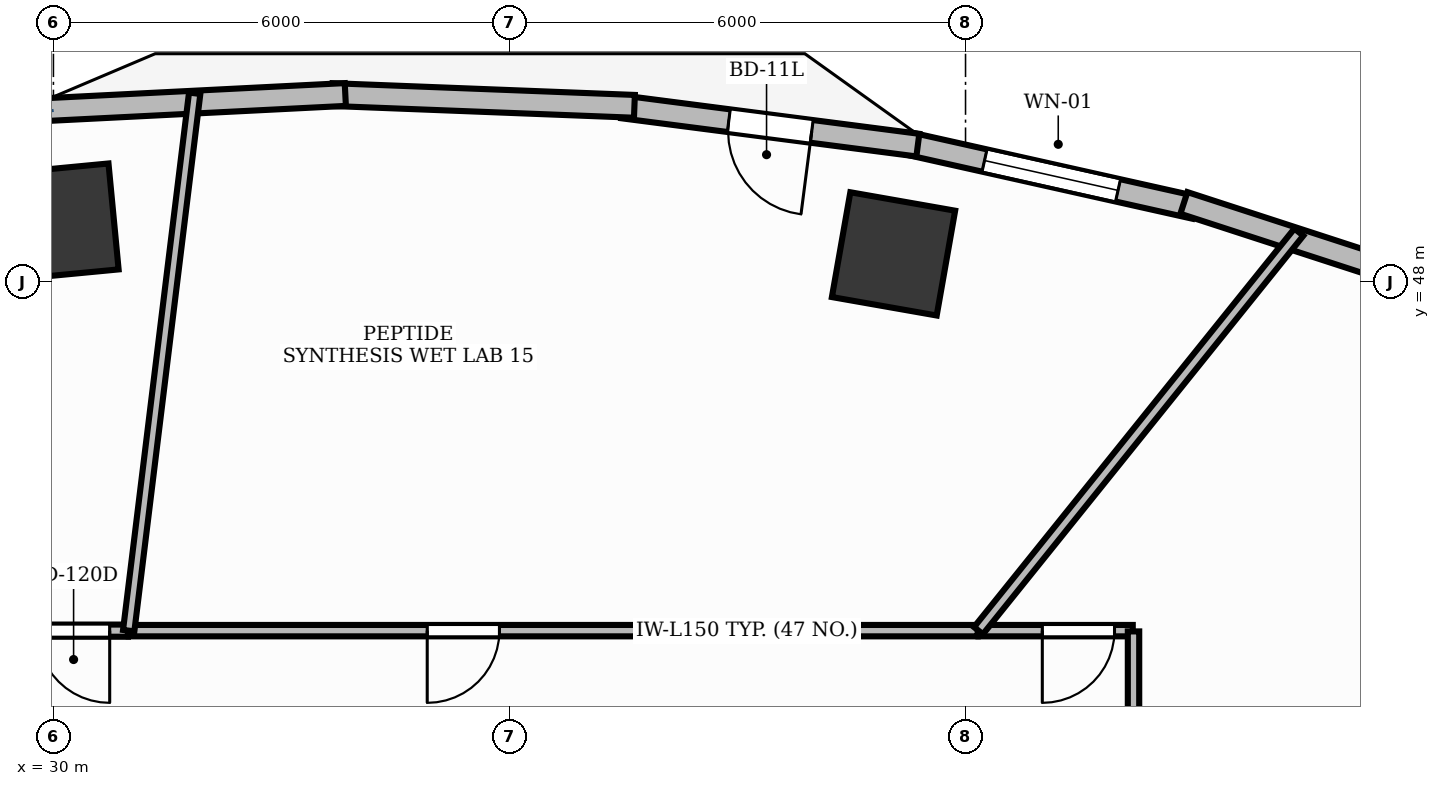
"""IFC4 building model, lengths in metres.
Left out: names, types, materials, properties, quantities, classifications, styles, units other than length and angle.
Written with IfcOpenShell. Run it as: python <this file> out.ifc"""

import sys

from ifc_helpers import new_model, si_unit, direction, frame, frame_2d, origin, origin_2d, place, context, subcontext, project, spatial, rectangle, extrude, element, fill, save


model = new_model("IFC4")
c1 = context("Model", 3, precision=1e-05, world=origin(), true_north=direction((0.0, 1.0)))
c2 = subcontext(c1, "Body", "Model", "MODEL_VIEW")
j1 = project(units=[si_unit("LENGTHUNIT", "METRE"), si_unit("PLANEANGLEUNIT", "RADIAN")], contexts=[c1])
p1 = place(None, origin())
s1 = spatial("IfcSite", under=j1, at=p1, CompositionType="ELEMENT")
p2 = place(p1, origin())
s2 = spatial("IfcBuilding", under=s1, at=p2, CompositionType="ELEMENT")
p3 = place(p2, frame((0.0, 0.0, 59.4)))
s3 = spatial("IfcBuildingStorey", under=s2, at=p3, CompositionType="ELEMENT", Elevation=59.4)
for number, where, z_axis, x_axis in (
    (1, (41.052, 48.367, -0.0), (0.0, 0.0, 1.0), (-0.985, 0.173, 0.0)),
    (2, (30.094, 48.792, -0.0), (0.0, 0.0, 1.0), (0.995, 0.095, 0.0)),
):
    element("IfcColumn", number, at=place(p3, frame(where, z_axis=z_axis, x_axis=x_axis)), inside=s3, PredefinedType="COLUMN", context=c2, shape_type="SweptSolid", body=[
        extrude(rectangle(XDim=1.4, YDim=1.4, at=origin_2d()), origin(), (0.0, 0.0, 1.0), 3.901),
    ])
p4 = place(p3, frame((45.016, 48.976, 0.0), z_axis=(0.0, 0.0, 1.0), x_axis=(-0.9758772609, 0.218319883791, 0.0)))
e3 = element("IfcWall", 3, at=p4, inside=s3, PredefinedType="STANDARD", context=c2, shape_type="SweptSolid", body=[
    extrude(rectangle(XDim=3.869, YDim=0.3, at=frame_2d((1.935, 0.0))), origin(), (0.0, 0.0, 1.0), 3.9),
])
p5 = place(p4, frame((1.034, 0.0, 0.9)))
e4 = element("IfcOpeningElement", 4, at=p5, cuts=e3, PredefinedType="OPENING", context=c2, shape_type="SweptSolid", body=[
    extrude(rectangle(XDim=1.8, YDim=2.1, at=frame_2d((0.9, 1.05))), frame((0.0, 0.165, 0.0), z_axis=(0.0, -1.0, 0.0), x_axis=(1.0, 0.0, 0.0)), (0.0, 0.0, 1.0), 0.33),
])
p6 = place(p3, frame((41.373, 49.798, 0.0), z_axis=(0.0, 0.0, 1.0), x_axis=(-0.991741322416, 0.128254237408, 0.0)))
e5 = element("IfcWall", 5, at=p6, inside=s3, PredefinedType="STANDARD", context=c2, shape_type="SweptSolid", body=[
    extrude(rectangle(XDim=3.916, YDim=0.3, at=frame_2d((1.958, 0.0))), origin(), (0.0, 0.0, 1.0), 3.47),
])
p7 = place(p6, frame((1.408, 0.0, 0.0)))
e6 = element("IfcOpeningElement", 6, at=p7, cuts=e5, PredefinedType="OPENING", context=c2, shape_type="SweptSolid", body=[
    extrude(rectangle(XDim=1.1, YDim=2.15, at=frame_2d((0.55, 1.075))), frame((0.0, 0.165, 0.0), z_axis=(0.0, -1.0, 0.0), x_axis=(1.0, 0.0, 0.0)), (0.0, 0.0, 1.0), 0.33),
])
p8 = place(p3, frame((48.525, 47.849, 0.0), z_axis=(0.0, 0.0, 1.0), x_axis=(-0.950965833732, 0.309295947393, 0.0)))
e7 = element("IfcWall", 7, at=p8, inside=s3, PredefinedType="STANDARD", context=c2, shape_type="SweptSolid", body=[
    extrude(rectangle(XDim=3.84, YDim=0.3, at=frame_2d((1.92, 0.0))), origin(), (0.0, 0.0, 1.0), 3.9),
])
p9 = place(p3, frame((37.644, 50.308, 0.0), z_axis=(0.0, 0.0, 1.0), x_axis=(-0.999245411623, 0.038840794937, 0.0)))
e8 = element("IfcWall", 8, at=p9, inside=s3, PredefinedType="STANDARD", context=c2, shape_type="SweptSolid", body=[
    extrude(rectangle(XDim=3.979, YDim=0.3, at=frame_2d((1.989, 0.0))), origin(), (0.0, 0.0, 1.0), 3.9),
])
p10 = place(p3, frame((33.84, 50.463, 0.0), z_axis=(0.0, 0.0, 1.0), x_axis=(-0.998732359232, -0.050335619826, 0.0)))
e9 = element("IfcWall", 9, at=p10, inside=s3, PredefinedType="STANDARD", context=c2, shape_type="SweptSolid", body=[
    extrude(rectangle(XDim=3.977, YDim=0.3, at=frame_2d((1.989, 0.0))), origin(), (0.0, 0.0, 1.0), 3.47),
])
p11 = place(p3, frame((44.2, 43.41, 0.0), z_axis=(0.0, 0.0, 1.0), x_axis=(-1.0, 0.0, 0.0)))
e10 = element("IfcWall", 10, at=p11, inside=s3, PredefinedType="PARTITIONING", context=c2, shape_type="SweptSolid", body=[
    extrude(rectangle(XDim=2.03, YDim=0.15, at=frame_2d((1.015, 0.0))), origin(), (0.0, 0.0, 1.0), 2.91),
])
p12 = place(p11, frame((0.24, 0.0, 0.0)))
e11 = element("IfcOpeningElement", 11, at=p12, cuts=e10, PredefinedType="OPENING", context=c2, shape_type="SweptSolid", body=[
    extrude(rectangle(XDim=0.95, YDim=2.15, at=frame_2d((0.475, 1.075))), frame((0.0, 0.09, 0.0), z_axis=(0.0, -1.0, 0.0), x_axis=(1.0, 0.0, 0.0)), (0.0, 0.0, 1.0), 0.18),
])
p13 = place(p3, frame((42.16, 43.41, 0.0), z_axis=(0.0, 0.0, 1.0), x_axis=(-1.0, 0.0, 0.0)))
e12 = element("IfcWall", 12, at=p13, inside=s3, PredefinedType="PARTITIONING", context=c2, shape_type="SweptSolid", body=[
    extrude(rectangle(XDim=11.17, YDim=0.15, at=frame_2d((5.585, 0.0))), origin(), (0.0, 0.0, 1.0), 2.91),
])
p14 = place(p13, frame((6.292, 0.0, 0.0)))
e13 = element("IfcOpeningElement", 13, at=p14, cuts=e12, PredefinedType="OPENING", context=c2, shape_type="SweptSolid", body=[
    extrude(rectangle(XDim=0.95, YDim=2.15, at=frame_2d((0.475, 1.075))), frame((0.0, 0.09, 0.0), z_axis=(0.0, -1.0, 0.0), x_axis=(1.0, 0.0, 0.0)), (0.0, 0.0, 1.0), 0.18),
])
p15 = place(p3, frame((30.98, 43.41, 0.0), z_axis=(0.0, 0.0, 1.0), x_axis=(-1.0, 0.0, 0.0)))
e14 = element("IfcWall", 14, at=p15, inside=s3, PredefinedType="PARTITIONING", context=c2, shape_type="SweptSolid", body=[
    extrude(rectangle(XDim=13.928, YDim=0.16, at=frame_2d((6.964, 0.0))), origin(), (0.0, 0.0, 1.0), 2.91),
])
p16 = place(p15, frame((0.24, 0.0, 0.0)))
e15 = element("IfcOpeningElement", 15, at=p16, cuts=e14, PredefinedType="OPENING", context=c2, shape_type="SweptSolid", body=[
    extrude(rectangle(XDim=0.95, YDim=2.15, at=frame_2d((0.475, 1.075))), frame((0.0, 0.095, 0.0), z_axis=(0.0, -1.0, 0.0), x_axis=(1.0, 0.0, 0.0)), (0.0, 0.0, 1.0), 0.19),
])
p17 = place(p3, frame((44.21, 35.958, 0.0), z_axis=(0.0, 0.0, 1.0), x_axis=(0.0, 1.0, 0.0)))
e16 = element("IfcWall", 16, at=p17, inside=s3, PredefinedType="PARTITIONING", context=c2, shape_type="SweptSolid", body=[
    extrude(rectangle(XDim=7.442, YDim=0.15, at=frame_2d((3.721, 0.0))), origin(), (0.0, 0.0, 1.0), 2.91),
])
p18 = place(p3, frame((42.17, 43.41, 0.0), z_axis=(0.0, 0.0, 1.0), x_axis=(0.626591923984, 0.779347522481, 0.0)))
e17 = element("IfcWall", 17, at=p18, inside=s3, PredefinedType="PARTITIONING", context=c2, shape_type="SweptSolid", body=[
    extrude(rectangle(XDim=6.727, YDim=0.15, at=frame_2d((3.364, 0.0))), origin(), (0.0, 0.0, 1.0), 2.91),
])
p19 = place(p3, frame((30.99, 43.41, 0.0), z_axis=(0.0, 0.0, 1.0), x_axis=(0.121849241754, 0.992548619607, 0.0)))
e18 = element("IfcWall", 18, at=p19, inside=s3, PredefinedType="PARTITIONING", context=c2, shape_type="SweptSolid", body=[
    extrude(rectangle(XDim=7.123, YDim=0.15, at=frame_2d((3.562, 0.0))), origin(), (0.0, 0.0, 1.0), 2.91),
])
p20 = place(p5, origin())
e19 = element("IfcWindow", 19, at=p20, inside=s3, PartitioningType="SINGLE_PANEL", PredefinedType="WINDOW", context=c2, shape_type="SweptSolid", body=[
    extrude(rectangle(XDim=1.8, YDim=2.1, at=frame_2d((0.9, 1.05))), frame((0.0, 0.03, 0.0), z_axis=(0.0, -1.0, 0.0), x_axis=(1.0, 0.0, 0.0)), (0.0, 0.0, 1.0), 0.06),
])
fill(e4, e19)
p21 = place(p7, origin())
e20 = element("IfcDoor", 20, at=p21, inside=s3, OperationType="SINGLE_SWING_LEFT", PredefinedType="DOOR", context=c2, shape_type="SweptSolid", body=[
    extrude(rectangle(XDim=1.1, YDim=2.15, at=frame_2d((0.55, 1.075))), frame((0.0, 0.025, 0.0), z_axis=(0.0, -1.0, 0.0), x_axis=(1.0, 0.0, 0.0)), (0.0, 0.0, 1.0), 0.05),
])
fill(e6, e20)
p22 = place(p12, origin())
e21 = element("IfcDoor", 21, at=p22, inside=s3, OperationType="SINGLE_SWING_RIGHT", PredefinedType="DOOR", context=c2, shape_type="SweptSolid", body=[
    extrude(rectangle(XDim=0.95, YDim=2.15, at=frame_2d((0.475, 1.075))), frame((0.0, 0.025, 0.0), z_axis=(0.0, -1.0, 0.0), x_axis=(1.0, 0.0, 0.0)), (0.0, 0.0, 1.0), 0.05),
])
fill(e11, e21)
p23 = place(p14, origin())
e22 = element("IfcDoor", 22, at=p23, inside=s3, OperationType="SINGLE_SWING_RIGHT", PredefinedType="DOOR", context=c2, shape_type="SweptSolid", body=[
    extrude(rectangle(XDim=0.95, YDim=2.15, at=frame_2d((0.475, 1.075))), frame((0.0, 0.025, 0.0), z_axis=(0.0, -1.0, 0.0), x_axis=(1.0, 0.0, 0.0)), (0.0, 0.0, 1.0), 0.05),
])
fill(e13, e22)
p24 = place(p16, origin())
e23 = element("IfcDoor", 23, at=p24, inside=s3, OperationType="SINGLE_SWING_LEFT", PredefinedType="DOOR", context=c2, shape_type="SweptSolid", body=[
    extrude(rectangle(XDim=0.95, YDim=2.15, at=frame_2d((0.475, 1.075))), frame((0.0, 0.025, 0.0), z_axis=(0.0, -1.0, 0.0), x_axis=(1.0, 0.0, 0.0)), (0.0, 0.0, 1.0), 0.05),
])
fill(e15, e23)
save(model, sys.argv[1])
